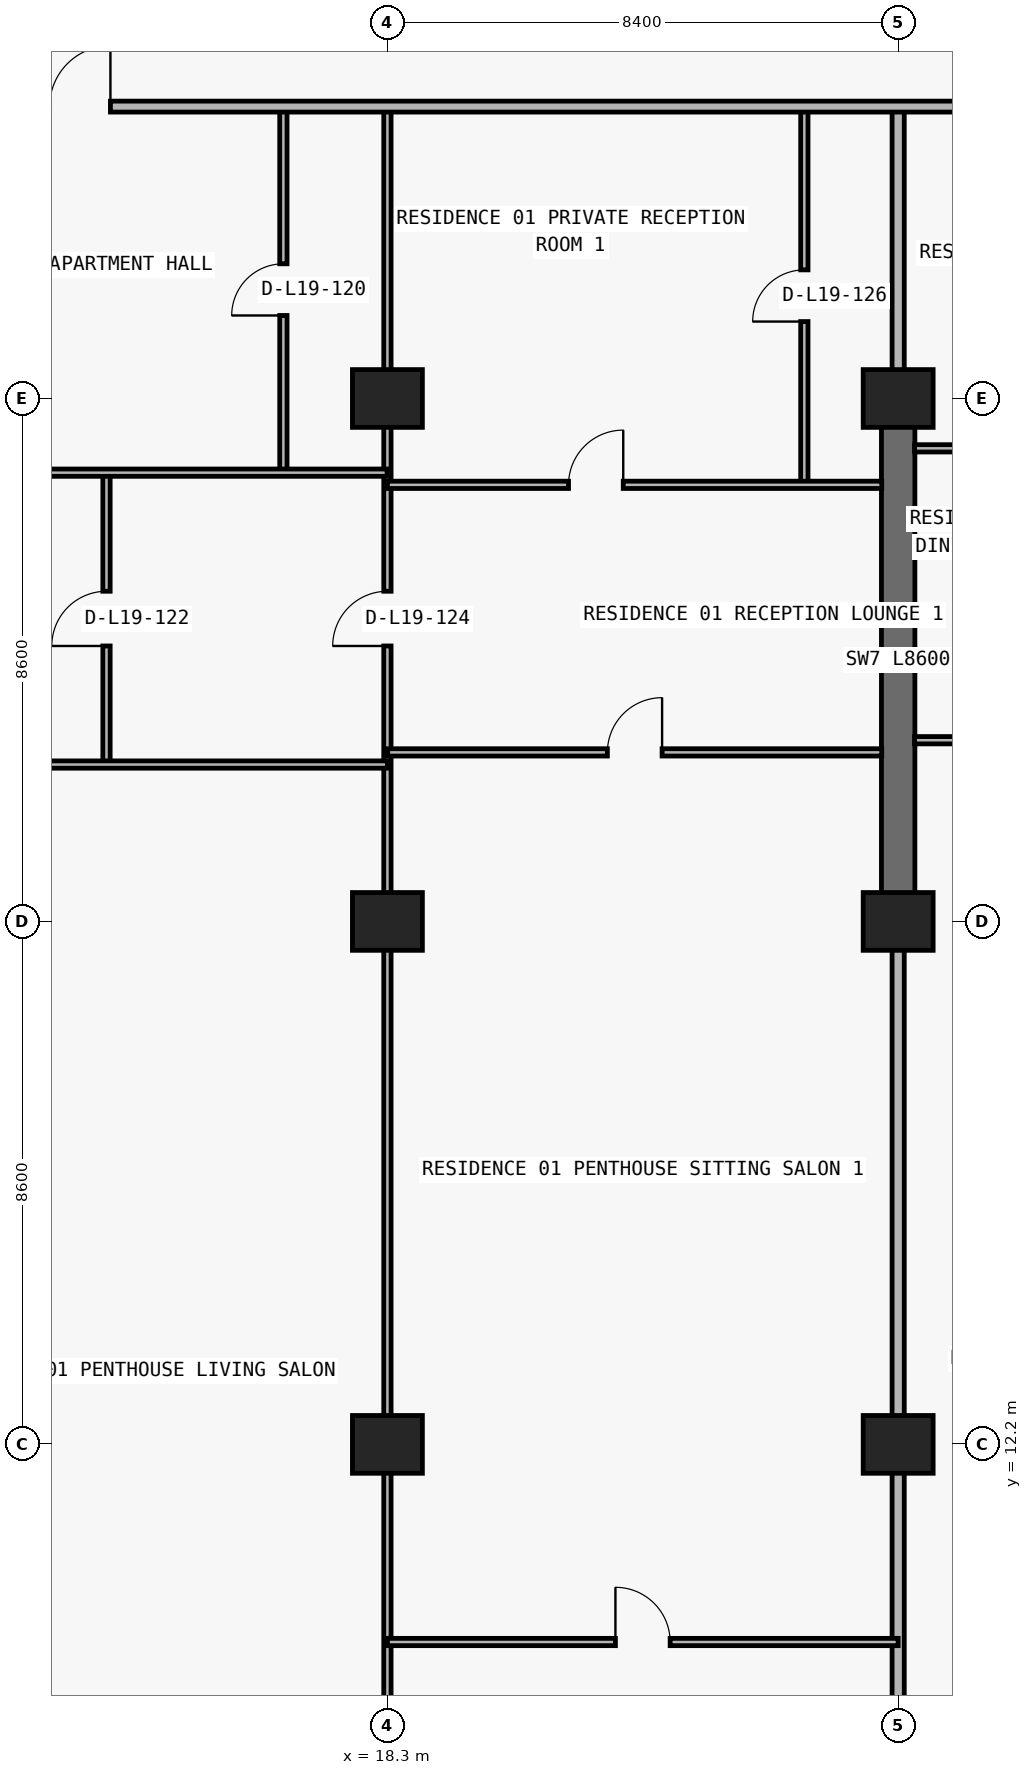
"""IFC4 building model, lengths in metres.
Left out: names, types, materials, properties, quantities, classifications, styles, units other than length and angle.
Written with IfcOpenShell. Run it as: python <this file> out.ifc"""

import sys

from ifc_helpers import new_model, si_unit, direction, frame, frame_2d, origin, origin_2d, place, context, subcontext, project, spatial, rectangle, extrude, element, fill, save


model = new_model("IFC4")
c1 = context("Model", 3, precision=1e-05, world=origin(), true_north=direction((0.0, 1.0)))
c2 = subcontext(c1, "Body", "Model", "MODEL_VIEW")
j1 = project(units=[si_unit("LENGTHUNIT", "METRE"), si_unit("PLANEANGLEUNIT", "RADIAN")], contexts=[c1])
p1 = place(None, origin())
s1 = spatial("IfcSite", under=j1, at=p1, CompositionType="ELEMENT")
p2 = place(p1, origin())
s2 = spatial("IfcBuilding", under=s1, at=p2, CompositionType="ELEMENT")
p3 = place(p2, frame((0.0, 0.0, 72.9)))
s3 = spatial("IfcBuildingStorey", under=s2, at=p3, CompositionType="ELEMENT", Elevation=72.9)
for number, where, z_axis, x_axis in (
    (1, (18.3, 12.2, 0.0), (0.0, 0.0, 1.0), (1.0, 0.0, 0.0)),
    (2, (26.7, 12.2, 0.0), (0.0, 0.0, 1.0), (1.0, 0.0, 0.0)),
    (3, (18.3, 20.8, 0.0), (0.0, 0.0, 1.0), (1.0, 0.0, 0.0)),
    (4, (26.7, 20.8, 0.0), (0.0, 0.0, 1.0), (1.0, 0.0, 0.0)),
    (5, (18.3, 29.4, 0.0), (0.0, 0.0, 1.0), (1.0, 0.0, 0.0)),
    (6, (26.7, 29.4, 0.0), (0.0, 0.0, 1.0), (1.0, 0.0, 0.0)),
):
    element("IfcColumn", number, at=place(p3, frame(where, z_axis=z_axis, x_axis=x_axis)), inside=s3, PredefinedType="COLUMN", context=c2, shape_type="SweptSolid", body=[
        extrude(rectangle(XDim=1.15, YDim=0.95, at=origin_2d()), origin(), (0.0, 0.0, 1.0), 3.05),
    ])
p4 = place(p3, frame((26.7, 20.8, 0.0), z_axis=(0.0, 0.0, 1.0), x_axis=(0.0, 1.0, 0.0)))
e7 = element("IfcWall", 7, at=p4, inside=s3, PredefinedType="SHEAR", context=c2, shape_type="SweptSolid", body=[
    extrude(rectangle(XDim=8.6, YDim=0.55, at=frame_2d((4.3, 0.0))), origin(), (0.0, 0.0, 1.0), 3.05),
])
p5 = place(p3, frame((13.68, 23.38, 0.0), z_axis=(0.0, 0.0, 1.0), x_axis=(0.0, 1.0, 0.0)))
e8 = element("IfcWall", 8, at=p5, inside=s3, PredefinedType="PARTITIONING", context=c2, shape_type="SweptSolid", body=[
    extrude(rectangle(XDim=4.8, YDim=0.12, at=frame_2d((2.4, 0.0))), origin(), (0.0, 0.0, 1.0), 3.05),
])
p6 = place(p5, frame((1.95, 0.0, 0.0)))
e9 = element("IfcOpeningElement", 9, at=p6, cuts=e8, PredefinedType="OPENING", context=c2, shape_type="SweptSolid", body=[
    extrude(rectangle(XDim=0.9, YDim=2.15, at=frame_2d((0.45, 1.075))), frame((0.0, 0.07, 0.0), z_axis=(0.0, -1.0, 0.0), x_axis=(1.0, 0.0, 0.0)), (0.0, 0.0, 1.0), 0.14),
])
p7 = place(p3, frame((16.589, 28.18, 0.0), z_axis=(0.0, 0.0, 1.0), x_axis=(0.0, 1.0, 0.0)))
e10 = element("IfcWall", 10, at=p7, inside=s3, PredefinedType="PARTITIONING", context=c2, shape_type="SweptSolid", body=[
    extrude(rectangle(XDim=6.02, YDim=0.12, at=frame_2d((3.01, 0.0))), origin(), (0.0, 0.0, 1.0), 3.05),
])
p8 = place(p7, frame((2.585, 0.0, 0.0)))
e11 = element("IfcOpeningElement", 11, at=p8, cuts=e10, PredefinedType="OPENING", context=c2, shape_type="SweptSolid", body=[
    extrude(rectangle(XDim=0.85, YDim=2.1, at=frame_2d((0.425, 1.05))), frame((0.0, 0.07, 0.0), z_axis=(0.0, -1.0, 0.0), x_axis=(1.0, 0.0, 0.0)), (0.0, 0.0, 1.0), 0.14),
])
p9 = place(p3, frame((18.3, 6.24, 0.0), z_axis=(0.0, 0.0, 1.0), x_axis=(0.0, 1.0, 0.0)))
e12 = element("IfcWall", 12, at=p9, inside=s3, PredefinedType="PARTITIONING", context=c2, shape_type="SweptSolid", body=[
    extrude(rectangle(XDim=27.96, YDim=0.12, at=frame_2d((13.98, 0.0))), origin(), (0.0, 0.0, 1.0), 2.11),
])
p10 = place(p9, frame((19.09, 0.0, 0.0)))
e13 = element("IfcOpeningElement", 13, at=p10, cuts=e12, PredefinedType="OPENING", context=c2, shape_type="SweptSolid", body=[
    extrude(rectangle(XDim=0.9, YDim=2.06, at=frame_2d((0.45, 1.03))), frame((0.0, 0.07, 0.0), z_axis=(0.0, -1.0, 0.0), x_axis=(1.0, 0.0, 0.0)), (0.0, 0.0, 1.0), 0.14),
])
p11 = place(p3, frame((25.157, 27.98, 0.0), z_axis=(0.0, 0.0, 1.0), x_axis=(0.0, 1.0, 0.0)))
e14 = element("IfcWall", 14, at=p11, inside=s3, PredefinedType="PARTITIONING", context=c2, shape_type="SweptSolid", body=[
    extrude(rectangle(XDim=6.22, YDim=0.12, at=frame_2d((3.11, 0.0))), origin(), (0.0, 0.0, 1.0), 3.05),
])
p12 = place(p11, frame((2.685, 0.0, 0.0)))
e15 = element("IfcOpeningElement", 15, at=p12, cuts=e14, PredefinedType="OPENING", context=c2, shape_type="SweptSolid", body=[
    extrude(rectangle(XDim=0.85, YDim=2.1, at=frame_2d((0.425, 1.05))), frame((0.0, 0.07, 0.0), z_axis=(0.0, -1.0, 0.0), x_axis=(1.0, 0.0, 0.0)), (0.0, 0.0, 1.0), 0.14),
])
p13 = place(p3, frame((26.7, 6.24, 0.0), z_axis=(0.0, 0.0, 1.0), x_axis=(0.0, 1.0, 0.0)))
e16 = element("IfcWall", 16, at=p13, inside=s3, PredefinedType="PARTITIONING", context=c2, shape_type="SweptSolid", body=[
    extrude(rectangle(XDim=14.555, YDim=0.2, at=frame_2d((7.277, 0.0))), origin(), (0.0, 0.0, 1.0), 2.11),
])
p14 = place(p3, frame((26.7, 29.405, 0.0), z_axis=(0.0, 0.0, 1.0), x_axis=(0.0, 1.0, 0.0)))
e17 = element("IfcWall", 17, at=p14, inside=s3, PredefinedType="PARTITIONING", context=c2, shape_type="SweptSolid", body=[
    extrude(rectangle(XDim=4.795, YDim=0.2, at=frame_2d((2.397, 0.0))), origin(), (0.0, 0.0, 1.0), 2.335),
])
p15 = place(p3, frame((18.3, 8.95, 0.0), z_axis=(0.0, 0.0, 1.0), x_axis=(1.0, 0.0, 0.0)))
e18 = element("IfcWall", 18, at=p15, inside=s3, PredefinedType="PARTITIONING", context=c2, shape_type="SweptSolid", body=[
    extrude(rectangle(XDim=8.4, YDim=0.12, at=frame_2d((4.2, 0.0))), origin(), (0.0, 0.0, 1.0), 3.05),
])
p16 = place(p15, frame((3.75, 0.0, 0.0)))
e19 = element("IfcOpeningElement", 19, at=p16, cuts=e18, PredefinedType="OPENING", context=c2, shape_type="SweptSolid", body=[
    extrude(rectangle(XDim=0.9, YDim=2.15, at=frame_2d((0.45, 1.075))), frame((0.0, 0.07, 0.0), z_axis=(0.0, -1.0, 0.0), x_axis=(1.0, 0.0, 0.0)), (0.0, 0.0, 1.0), 0.14),
])
p17 = place(p3, frame((9.9, 23.38, 0.0), z_axis=(0.0, 0.0, 1.0), x_axis=(1.0, 0.0, 0.0)))
e20 = element("IfcWall", 20, at=p17, inside=s3, PredefinedType="PARTITIONING", context=c2, shape_type="SweptSolid", body=[
    extrude(rectangle(XDim=8.4, YDim=0.12, at=frame_2d((4.2, 0.0))), origin(), (0.0, 0.0, 1.0), 3.05),
])
p18 = place(p17, frame((1.44, 0.0, 0.0)))
e21 = element("IfcOpeningElement", 21, at=p18, cuts=e20, PredefinedType="OPENING", context=c2, shape_type="SweptSolid", body=[
    extrude(rectangle(XDim=0.9, YDim=2.15, at=frame_2d((0.45, 1.075))), frame((0.0, 0.07, 0.0), z_axis=(0.0, -1.0, 0.0), x_axis=(1.0, 0.0, 0.0)), (0.0, 0.0, 1.0), 0.14),
])
p19 = place(p3, frame((18.305, 23.58, 0.0), z_axis=(0.0, 0.0, 1.0), x_axis=(1.0, 0.0, 0.0)))
e22 = element("IfcWall", 22, at=p19, inside=s3, PredefinedType="PARTITIONING", context=c2, shape_type="SweptSolid", body=[
    extrude(rectangle(XDim=8.125, YDim=0.12, at=frame_2d((4.062, 0.0))), origin(), (0.0, 0.0, 1.0), 3.05),
])
p20 = place(p19, frame((3.613, 0.0, 0.0)))
e23 = element("IfcOpeningElement", 23, at=p20, cuts=e22, PredefinedType="OPENING", context=c2, shape_type="SweptSolid", body=[
    extrude(rectangle(XDim=0.9, YDim=2.15, at=frame_2d((0.45, 1.075))), frame((0.0, 0.07, 0.0), z_axis=(0.0, -1.0, 0.0), x_axis=(1.0, 0.0, 0.0)), (0.0, 0.0, 1.0), 0.14),
])
p21 = place(p3, frame((26.97, 23.78, 0.0), z_axis=(0.0, 0.0, 1.0), x_axis=(1.0, 0.0, 0.0)))
e24 = element("IfcWall", 24, at=p21, inside=s3, PredefinedType="PARTITIONING", context=c2, shape_type="SweptSolid", body=[
    extrude(rectangle(XDim=8.13, YDim=0.12, at=frame_2d((4.065, 0.0))), origin(), (0.0, 0.0, 1.0), 3.05),
])
p22 = place(p21, frame((1.179, 0.0, 0.0)))
e25 = element("IfcOpeningElement", 25, at=p22, cuts=e24, PredefinedType="OPENING", context=c2, shape_type="SweptSolid", body=[
    extrude(rectangle(XDim=0.9, YDim=2.15, at=frame_2d((0.45, 1.075))), frame((0.0, 0.07, 0.0), z_axis=(0.0, -1.0, 0.0), x_axis=(1.0, 0.0, 0.0)), (0.0, 0.0, 1.0), 0.14),
])
p23 = place(p3, frame((18.3, 27.98, 0.0), z_axis=(0.0, 0.0, 1.0), x_axis=(1.0, 0.0, 0.0)))
e26 = element("IfcWall", 26, at=p23, inside=s3, PredefinedType="PARTITIONING", context=c2, shape_type="SweptSolid", body=[
    extrude(rectangle(XDim=8.13, YDim=0.12, at=frame_2d((4.065, 0.0))), origin(), (0.0, 0.0, 1.0), 3.05),
])
p24 = place(p23, frame((2.979, 0.0, 0.0)))
e27 = element("IfcOpeningElement", 27, at=p24, cuts=e26, PredefinedType="OPENING", context=c2, shape_type="SweptSolid", body=[
    extrude(rectangle(XDim=0.9, YDim=2.15, at=frame_2d((0.45, 1.075))), frame((0.0, 0.07, 0.0), z_axis=(0.0, -1.0, 0.0), x_axis=(1.0, 0.0, 0.0)), (0.0, 0.0, 1.0), 0.14),
])
p25 = place(p3, frame((9.9, 28.18, 0.0), z_axis=(0.0, 0.0, 1.0), x_axis=(1.0, 0.0, 0.0)))
e28 = element("IfcWall", 28, at=p25, inside=s3, PredefinedType="PARTITIONING", context=c2, shape_type="SweptSolid", body=[
    extrude(rectangle(XDim=8.395, YDim=0.12, at=frame_2d((4.198, 0.0))), origin(), (0.0, 0.0, 1.0), 3.05),
])
p26 = place(p25, frame((1.44, 0.0, 0.0)))
e29 = element("IfcOpeningElement", 29, at=p26, cuts=e28, PredefinedType="OPENING", context=c2, shape_type="SweptSolid", body=[
    extrude(rectangle(XDim=0.9, YDim=2.15, at=frame_2d((0.45, 1.075))), frame((0.0, 0.07, 0.0), z_axis=(0.0, -1.0, 0.0), x_axis=(1.0, 0.0, 0.0)), (0.0, 0.0, 1.0), 0.14),
])
p27 = place(p3, frame((26.97, 28.58, 0.0), z_axis=(0.0, 0.0, 1.0), x_axis=(1.0, 0.0, 0.0)))
e30 = element("IfcWall", 30, at=p27, inside=s3, PredefinedType="PARTITIONING", context=c2, shape_type="SweptSolid", body=[
    extrude(rectangle(XDim=8.125, YDim=0.12, at=frame_2d((4.062, 0.0))), origin(), (0.0, 0.0, 1.0), 3.05),
])
p28 = place(p27, frame((1.179, 0.0, 0.0)))
e31 = element("IfcOpeningElement", 31, at=p28, cuts=e30, PredefinedType="OPENING", context=c2, shape_type="SweptSolid", body=[
    extrude(rectangle(XDim=0.9, YDim=2.15, at=frame_2d((0.45, 1.075))), frame((0.0, 0.07, 0.0), z_axis=(0.0, -1.0, 0.0), x_axis=(1.0, 0.0, 0.0)), (0.0, 0.0, 1.0), 0.14),
])
p29 = place(p3, frame((5.105, 34.2, 0.0), z_axis=(0.0, 0.0, 1.0), x_axis=(1.0, 0.0, 0.0)))
e32 = element("IfcWall", 32, at=p29, inside=s3, PredefinedType="PARTITIONING", context=c2, shape_type="SweptSolid", body=[
    extrude(rectangle(XDim=67.595, YDim=0.18, at=frame_2d((33.797, 0.0))), origin(), (0.0, 0.0, 1.0), 3.05),
])
p30 = place(p29, frame((7.639, 0.0, 0.0)))
e33 = element("IfcOpeningElement", 33, at=p30, cuts=e32, PredefinedType="OPENING", context=c2, shape_type="SweptSolid", body=[
    extrude(rectangle(XDim=1.0, YDim=2.2, at=frame_2d((0.5, 1.1))), frame((0.0, 0.1, 0.0), z_axis=(0.0, -1.0, 0.0), x_axis=(1.0, 0.0, 0.0)), (0.0, 0.0, 1.0), 0.2),
])
p31 = place(p29, frame((24.423, 0.0, 0.0)))
e34 = element("IfcOpeningElement", 34, at=p31, cuts=e32, PredefinedType="OPENING", context=c2, shape_type="SweptSolid", body=[
    extrude(rectangle(XDim=1.0, YDim=2.2, at=frame_2d((0.5, 1.1))), frame((0.0, 0.1, 0.0), z_axis=(0.0, -1.0, 0.0), x_axis=(1.0, 0.0, 0.0)), (0.0, 0.0, 1.0), 0.2),
])
p32 = place(p29, frame((48.825, 0.0, 0.0)))
e35 = element("IfcOpeningElement", 35, at=p32, cuts=e32, PredefinedType="OPENING", context=c2, shape_type="SweptSolid", body=[
    extrude(rectangle(XDim=1.0, YDim=2.2, at=frame_2d((0.5, 1.1))), frame((0.0, 0.1, 0.0), z_axis=(0.0, -1.0, 0.0), x_axis=(1.0, 0.0, 0.0)), (0.0, 0.0, 1.0), 0.2),
])
p33 = place(p30, origin())
e36 = element("IfcDoor", 36, at=p33, inside=s3, OperationType="SINGLE_SWING_RIGHT", PredefinedType="DOOR", context=c2, shape_type="SweptSolid", body=[
    extrude(rectangle(XDim=1.0, YDim=2.2, at=frame_2d((0.5, 1.1))), frame((0.0, 0.025, 0.0), z_axis=(0.0, -1.0, 0.0), x_axis=(1.0, 0.0, 0.0)), (0.0, 0.0, 1.0), 0.05),
])
fill(e33, e36)
p34 = place(p8, origin())
e37 = element("IfcDoor", 37, at=p34, inside=s3, OperationType="SINGLE_SWING_LEFT", PredefinedType="DOOR", context=c2, shape_type="SweptSolid", body=[
    extrude(rectangle(XDim=0.85, YDim=2.1, at=frame_2d((0.425, 1.05))), frame((0.0, 0.025, 0.0), z_axis=(0.0, -1.0, 0.0), x_axis=(1.0, 0.0, 0.0)), (0.0, 0.0, 1.0), 0.05),
])
fill(e11, e37)
p35 = place(p6, origin())
e38 = element("IfcDoor", 38, at=p35, inside=s3, OperationType="SINGLE_SWING_LEFT", PredefinedType="DOOR", context=c2, shape_type="SweptSolid", body=[
    extrude(rectangle(XDim=0.9, YDim=2.15, at=frame_2d((0.45, 1.075))), frame((0.0, 0.025, 0.0), z_axis=(0.0, -1.0, 0.0), x_axis=(1.0, 0.0, 0.0)), (0.0, 0.0, 1.0), 0.05),
])
fill(e9, e38)
p36 = place(p10, origin())
e39 = element("IfcDoor", 39, at=p36, inside=s3, OperationType="SINGLE_SWING_LEFT", PredefinedType="DOOR", context=c2, shape_type="SweptSolid", body=[
    extrude(rectangle(XDim=0.9, YDim=2.06, at=frame_2d((0.45, 1.03))), frame((0.0, 0.025, 0.0), z_axis=(0.0, -1.0, 0.0), x_axis=(1.0, 0.0, 0.0)), (0.0, 0.0, 1.0), 0.05),
])
fill(e13, e39)
p37 = place(p24, origin())
e40 = element("IfcDoor", 40, at=p37, inside=s3, OperationType="SINGLE_SWING_RIGHT", PredefinedType="DOOR", context=c2, shape_type="SweptSolid", body=[
    extrude(rectangle(XDim=0.9, YDim=2.15, at=frame_2d((0.45, 1.075))), frame((0.0, 0.025, 0.0), z_axis=(0.0, -1.0, 0.0), x_axis=(1.0, 0.0, 0.0)), (0.0, 0.0, 1.0), 0.05),
])
fill(e27, e40)
p38 = place(p12, origin())
e41 = element("IfcDoor", 41, at=p38, inside=s3, OperationType="SINGLE_SWING_LEFT", PredefinedType="DOOR", context=c2, shape_type="SweptSolid", body=[
    extrude(rectangle(XDim=0.85, YDim=2.1, at=frame_2d((0.425, 1.05))), frame((0.0, 0.025, 0.0), z_axis=(0.0, -1.0, 0.0), x_axis=(1.0, 0.0, 0.0)), (0.0, 0.0, 1.0), 0.05),
])
fill(e15, e41)
p39 = place(p20, origin())
e42 = element("IfcDoor", 42, at=p39, inside=s3, OperationType="SINGLE_SWING_RIGHT", PredefinedType="DOOR", context=c2, shape_type="SweptSolid", body=[
    extrude(rectangle(XDim=0.9, YDim=2.15, at=frame_2d((0.45, 1.075))), frame((0.0, 0.025, 0.0), z_axis=(0.0, -1.0, 0.0), x_axis=(1.0, 0.0, 0.0)), (0.0, 0.0, 1.0), 0.05),
])
fill(e23, e42)
p40 = place(p16, origin())
e43 = element("IfcDoor", 43, at=p40, inside=s3, OperationType="SINGLE_SWING_LEFT", PredefinedType="DOOR", context=c2, shape_type="SweptSolid", body=[
    extrude(rectangle(XDim=0.9, YDim=2.15, at=frame_2d((0.45, 1.075))), frame((0.0, 0.025, 0.0), z_axis=(0.0, -1.0, 0.0), x_axis=(1.0, 0.0, 0.0)), (0.0, 0.0, 1.0), 0.05),
])
fill(e19, e43)
save(model, sys.argv[1])
